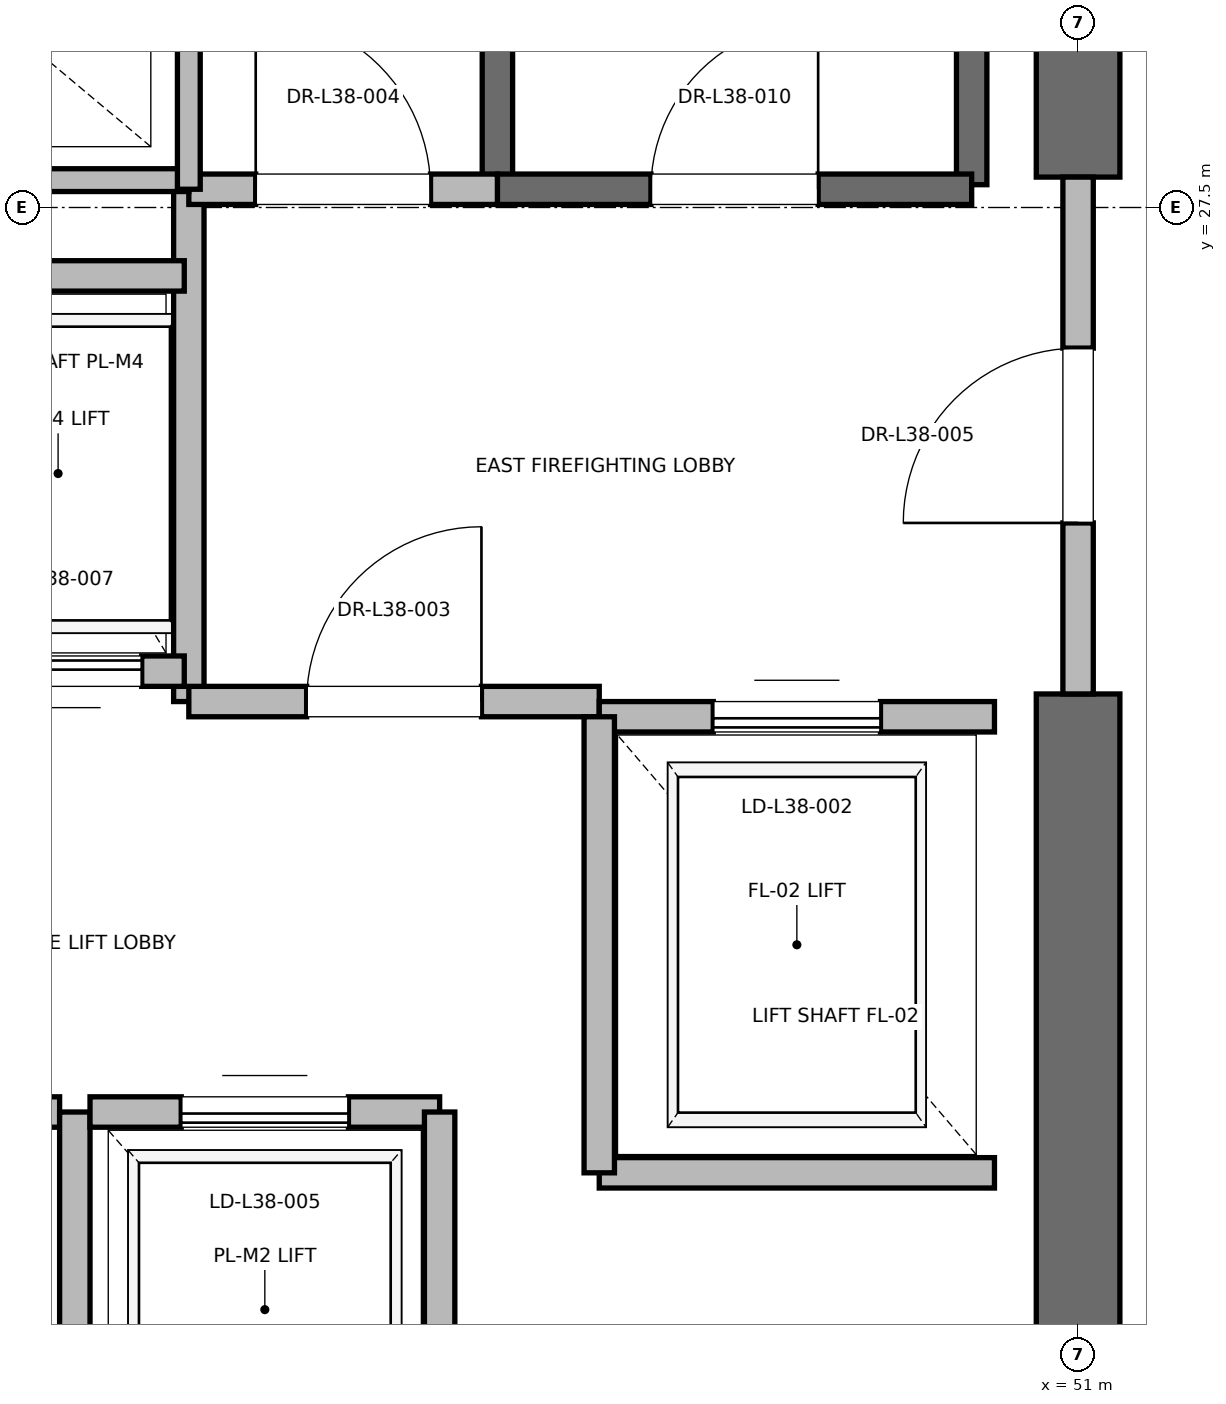
"""IFC4 building model, lengths in metres.
Left out: names, types, materials, properties, quantities, classifications, styles, units other than length and angle.
Written with IfcOpenShell. Run it as: python <this file> out.ifc"""

import sys

from ifc_helpers import new_model, si_unit, direction, frame, frame_2d, origin, place, context, subcontext, project, spatial, rectangle, extrude, element, fill, save


model = new_model("IFC4")
c1 = context("Model", 3, precision=1e-05, world=origin(), true_north=direction((0.0, 1.0)))
c2 = subcontext(c1, "Body", "Model", "MODEL_VIEW")
j1 = project(units=[si_unit("LENGTHUNIT", "METRE"), si_unit("PLANEANGLEUNIT", "RADIAN")], contexts=[c1])
p1 = place(None, origin())
s1 = spatial("IfcSite", under=j1, at=p1, CompositionType="ELEMENT")
p2 = place(p1, origin())
s2 = spatial("IfcBuilding", under=s1, at=p2, CompositionType="ELEMENT")
p3 = place(p2, frame((0.0, 0.0, 164.4)))
s3 = spatial("IfcBuildingStorey", under=s2, at=p3, CompositionType="ELEMENT", Elevation=164.4)
p4 = place(p3, frame((51.0, 18.5, 0.0), z_axis=(0.0, 0.0, 1.0), x_axis=(0.0, 1.0, 0.0)))
e1 = element("IfcWall", 1, at=p4, inside=s3, PredefinedType="SHEAR", context=c2, shape_type="SweptSolid", body=[
    extrude(rectangle(XDim=5.8, YDim=0.55, at=frame_2d((2.9, 0.0))), origin(), (0.0, 0.0, 1.0), 3.775),
])
p5 = place(p3, frame((51.0, 27.7, 0.0), z_axis=(0.0, 0.0, 1.0), x_axis=(0.0, 1.0, 0.0)))
e2 = element("IfcWall", 2, at=p5, inside=s3, PredefinedType="SHEAR", context=c2, shape_type="SweptSolid", body=[
    extrude(rectangle(XDim=8.8, YDim=0.55, at=frame_2d((4.4, 0.0))), origin(), (0.0, 0.0, 1.0), 3.775),
])
p6 = place(p3, frame((50.3, 27.65, 0.0), z_axis=(0.0, 0.0, 1.0), x_axis=(0.0, 1.0, 0.0)))
e3 = element("IfcWall", 3, at=p6, inside=s3, PredefinedType="SOLIDWALL", context=c2, shape_type="SweptSolid", body=[
    extrude(rectangle(XDim=8.15, YDim=0.2, at=frame_2d((4.075, 0.0))), origin(), (0.0, 0.0, 1.0), 3.775),
])
p7 = place(p3, frame((47.18, 27.62, 0.0), z_axis=(0.0, 0.0, 1.0), x_axis=(0.0, 1.0, 0.0)))
e4 = element("IfcWall", 4, at=p7, inside=s3, PredefinedType="SOLIDWALL", context=c2, shape_type="SweptSolid", body=[
    extrude(rectangle(XDim=8.18, YDim=0.2, at=frame_2d((4.09, 0.0))), origin(), (0.0, 0.0, 1.0), 3.775),
])
p8 = place(p3, frame((47.18, 27.62, 0.0), z_axis=(0.0, 0.0, 1.0), x_axis=(1.0, 0.0, 0.0)))
e5 = element("IfcWall", 5, at=p8, inside=s3, PredefinedType="SOLIDWALL", context=c2, shape_type="SweptSolid", body=[
    extrude(rectangle(XDim=3.12, YDim=0.2, at=frame_2d((1.56, 0.0))), origin(), (0.0, 0.0, 1.0), 3.775),
])
p9 = place(p8, frame((1.01, 0.0, 0.0)))
e6 = element("IfcOpeningElement", 6, at=p9, cuts=e5, PredefinedType="OPENING", context=c2, shape_type="SweptSolid", body=[
    extrude(rectangle(XDim=1.1, YDim=2.15, at=frame_2d((0.55, 1.075))), frame((0.0, 0.1, 0.0), z_axis=(0.0, -1.0, 0.0), x_axis=(1.0, 0.0, 0.0)), (0.0, 0.0, 1.0), 0.2),
])
p10 = place(p3, frame((45.15, 24.25, 0.0), z_axis=(0.0, 0.0, 1.0), x_axis=(0.0, 1.0, 0.0)))
e7 = element("IfcWall", 7, at=p10, inside=s3, PredefinedType="PARTITIONING", context=c2, shape_type="SweptSolid", body=[
    extrude(rectangle(XDim=3.37, YDim=0.2, at=frame_2d((1.685, 0.0))), origin(), (0.0, 0.0, 1.0), 3.775),
])
p11 = place(p3, frame((45.15, 24.25, 0.0), z_axis=(0.0, 0.0, 1.0), x_axis=(1.0, 0.0, 0.0)))
e8 = element("IfcWall", 8, at=p11, inside=s3, PredefinedType="PARTITIONING", context=c2, shape_type="SweptSolid", body=[
    extrude(rectangle(XDim=2.7, YDim=0.2, at=frame_2d((1.35, 0.0))), origin(), (0.0, 0.0, 1.0), 3.775),
])
p12 = place(p11, frame((0.775, 0.0, 0.0)))
e9 = element("IfcOpeningElement", 9, at=p12, cuts=e8, PredefinedType="OPENING", context=c2, shape_type="SweptSolid", body=[
    extrude(rectangle(XDim=1.15, YDim=2.2, at=frame_2d((0.575, 1.1))), frame((0.0, 0.1, 0.0), z_axis=(0.0, -1.0, 0.0), x_axis=(1.0, 0.0, 0.0)), (0.0, 0.0, 1.0), 0.2),
])
p13 = place(p3, frame((45.15, 27.62, 0.0), z_axis=(0.0, 0.0, 1.0), x_axis=(1.0, 0.0, 0.0)))
e10 = element("IfcWall", 10, at=p13, inside=s3, PredefinedType="PARTITIONING", context=c2, shape_type="SweptSolid", body=[
    extrude(rectangle(XDim=2.03, YDim=0.2, at=frame_2d((1.015, 0.0))), origin(), (0.0, 0.0, 1.0), 3.775),
])
p14 = place(p13, frame((0.44, 0.0, 0.0)))
e11 = element("IfcOpeningElement", 11, at=p14, cuts=e10, PredefinedType="OPENING", context=c2, shape_type="SweptSolid", body=[
    extrude(rectangle(XDim=1.15, YDim=2.2, at=frame_2d((0.575, 1.1))), frame((0.0, 0.1, 0.0), z_axis=(0.0, -1.0, 0.0), x_axis=(1.0, 0.0, 0.0)), (0.0, 0.0, 1.0), 0.2),
])
p15 = place(p3, frame((51.0, 24.3, 0.0), z_axis=(0.0, 0.0, 1.0), x_axis=(0.0, 1.0, 0.0)))
e12 = element("IfcWall", 12, at=p15, inside=s3, PredefinedType="PARTITIONING", context=c2, shape_type="SweptSolid", body=[
    extrude(rectangle(XDim=3.4, YDim=0.2, at=frame_2d((1.7, 0.0))), origin(), (0.0, 0.0, 1.0), 2.755),
])
p16 = place(p15, frame((1.125, 0.0, 0.0)))
e13 = element("IfcOpeningElement", 13, at=p16, cuts=e12, PredefinedType="OPENING", context=c2, shape_type="SweptSolid", body=[
    extrude(rectangle(XDim=1.15, YDim=2.2, at=frame_2d((0.575, 1.1))), frame((0.0, 0.1, 0.0), z_axis=(0.0, -1.0, 0.0), x_axis=(1.0, 0.0, 0.0)), (0.0, 0.0, 1.0), 0.2),
])
p17 = place(p3, frame((47.85, 21.15, 0.0), z_axis=(0.0, 0.0, 1.0), x_axis=(1.0, 0.0, 0.0)))
e14 = element("IfcWall", 14, at=p17, inside=s3, PredefinedType="SOLIDWALL", context=c2, shape_type="SweptSolid", body=[
    extrude(rectangle(XDim=2.6, YDim=0.2, at=frame_2d((1.3, 0.0))), origin(), (0.0, 0.0, 1.0), 3.775),
])
p18 = place(p3, frame((50.45, 24.15, 0.0), z_axis=(0.0, 0.0, 1.0), x_axis=(-1.0, 0.0, 0.0)))
e15 = element("IfcWall", 15, at=p18, inside=s3, PredefinedType="SOLIDWALL", context=c2, shape_type="SweptSolid", body=[
    extrude(rectangle(XDim=2.6, YDim=0.2, at=frame_2d((1.3, 0.0))), origin(), (0.0, 0.0, 1.0), 2.755),
])
p19 = place(p18, frame((0.75, 0.0, 0.0)))
e16 = element("IfcOpeningElement", 16, at=p19, cuts=e15, PredefinedType="OPENING", context=c2, shape_type="SweptSolid", body=[
    extrude(rectangle(XDim=1.1, YDim=2.2, at=frame_2d((0.55, 1.1))), frame((0.0, 0.1, 0.0), z_axis=(0.0, -1.0, 0.0), x_axis=(1.0, 0.0, 0.0)), (0.0, 0.0, 1.0), 0.2),
])
p20 = place(p3, frame((47.85, 24.15, 0.0), z_axis=(0.0, 0.0, 1.0), x_axis=(0.0, -1.0, 0.0)))
e17 = element("IfcWall", 17, at=p20, inside=s3, PredefinedType="SOLIDWALL", context=c2, shape_type="SweptSolid", body=[
    extrude(rectangle(XDim=3.0, YDim=0.2, at=frame_2d((1.5, 0.0))), origin(), (0.0, 0.0, 1.0), 3.775),
])
p21 = place(p3, frame((44.3, 21.55, 0.0), z_axis=(0.0, 0.0, 1.0), x_axis=(-1.0, 0.0, 0.0)))
e18 = element("IfcWall", 18, at=p21, inside=s3, PredefinedType="SOLIDWALL", context=c2, shape_type="SweptSolid", body=[
    extrude(rectangle(XDim=2.3, YDim=0.2, at=frame_2d((1.15, 0.0))), origin(), (0.0, 0.0, 1.0), 3.775),
])
p22 = place(p21, frame((0.6, 0.0, 0.0)))
e19 = element("IfcOpeningElement", 19, at=p22, cuts=e18, PredefinedType="OPENING", context=c2, shape_type="SweptSolid", body=[
    extrude(rectangle(XDim=1.1, YDim=2.2, at=frame_2d((0.55, 1.1))), frame((0.0, 0.1, 0.0), z_axis=(0.0, -1.0, 0.0), x_axis=(1.0, 0.0, 0.0)), (0.0, 0.0, 1.0), 0.2),
])
p23 = place(p3, frame((44.4, 18.95, 0.0), z_axis=(0.0, 0.0, 1.0), x_axis=(0.0, 1.0, 0.0)))
e20 = element("IfcWall", 20, at=p23, inside=s3, PredefinedType="SOLIDWALL", context=c2, shape_type="SweptSolid", body=[
    extrude(rectangle(XDim=2.6, YDim=0.2, at=frame_2d((1.3, 0.0))), origin(), (0.0, 0.0, 1.0), 3.775),
])
p24 = place(p3, frame((46.8, 21.55, 0.0), z_axis=(0.0, 0.0, 1.0), x_axis=(-1.0, 0.0, 0.0)))
e21 = element("IfcWall", 21, at=p24, inside=s3, PredefinedType="SOLIDWALL", context=c2, shape_type="SweptSolid", body=[
    extrude(rectangle(XDim=2.3, YDim=0.2, at=frame_2d((1.15, 0.0))), origin(), (0.0, 0.0, 1.0), 3.775),
])
p25 = place(p24, frame((0.6, 0.0, 0.0)))
e22 = element("IfcOpeningElement", 22, at=p25, cuts=e21, PredefinedType="OPENING", context=c2, shape_type="SweptSolid", body=[
    extrude(rectangle(XDim=1.1, YDim=2.2, at=frame_2d((0.55, 1.1))), frame((0.0, 0.1, 0.0), z_axis=(0.0, -1.0, 0.0), x_axis=(1.0, 0.0, 0.0)), (0.0, 0.0, 1.0), 0.2),
])
p26 = place(p3, frame((46.8, 18.95, 0.0), z_axis=(0.0, 0.0, 1.0), x_axis=(0.0, 1.0, 0.0)))
e23 = element("IfcWall", 23, at=p26, inside=s3, PredefinedType="SOLIDWALL", context=c2, shape_type="SweptSolid", body=[
    extrude(rectangle(XDim=2.6, YDim=0.2, at=frame_2d((1.3, 0.0))), origin(), (0.0, 0.0, 1.0), 3.775),
])
p27 = place(p3, frame((43.46, 24.45, 0.0), z_axis=(0.0, 0.0, 1.0), x_axis=(1.0, 0.0, 0.0)))
e24 = element("IfcWall", 24, at=p27, inside=s3, PredefinedType="SOLIDWALL", context=c2, shape_type="SweptSolid", body=[
    extrude(rectangle(XDim=1.66, YDim=0.2, at=frame_2d((0.83, 0.0))), origin(), (0.0, 0.0, 1.0), 3.775),
])
p28 = place(p27, frame((0.28, 0.0, 0.0)))
e25 = element("IfcOpeningElement", 25, at=p28, cuts=e24, PredefinedType="OPENING", context=c2, shape_type="SweptSolid", body=[
    extrude(rectangle(XDim=1.1, YDim=2.2, at=frame_2d((0.55, 1.1))), frame((0.0, 0.1, 0.0), z_axis=(0.0, -1.0, 0.0), x_axis=(1.0, 0.0, 0.0)), (0.0, 0.0, 1.0), 0.2),
])
p29 = place(p3, frame((45.12, 27.05, 0.0), z_axis=(0.0, 0.0, 1.0), x_axis=(-1.0, 0.0, 0.0)))
e26 = element("IfcWall", 26, at=p29, inside=s3, PredefinedType="SOLIDWALL", context=c2, shape_type="SweptSolid", body=[
    extrude(rectangle(XDim=1.66, YDim=0.2, at=frame_2d((0.83, 0.0))), origin(), (0.0, 0.0, 1.0), 3.775),
])
p30 = place(p3, frame((41.56, 27.68, 0.0), z_axis=(0.0, 0.0, 1.0), x_axis=(1.0, 0.0, 0.0)))
e27 = element("IfcWall", 27, at=p30, inside=s3, PredefinedType="PARTITIONING", context=c2, shape_type="SweptSolid", body=[
    extrude(rectangle(XDim=3.59, YDim=0.15, at=frame_2d((1.795, 0.0))), origin(), (0.0, 0.0, 1.0), 2.85),
])
p31 = place(p3, frame((45.15, 27.62, 0.0), z_axis=(0.0, 0.0, 1.0), x_axis=(0.0, 1.0, 0.0)))
e28 = element("IfcWall", 28, at=p31, inside=s3, PredefinedType="PARTITIONING", context=c2, shape_type="SweptSolid", body=[
    extrude(rectangle(XDim=3.1, YDim=0.15, at=frame_2d((1.55, 0.0))), origin(), (0.0, 0.0, 1.0), 2.85),
])
p32 = place(p9, origin())
e29 = element("IfcDoor", 29, at=p32, inside=s3, OperationType="SINGLE_SWING_RIGHT", PredefinedType="DOOR", context=c2, shape_type="SweptSolid", body=[
    extrude(rectangle(XDim=1.1, YDim=2.15, at=frame_2d((0.55, 1.075))), frame((0.0, 0.025, 0.0), z_axis=(0.0, -1.0, 0.0), x_axis=(1.0, 0.0, 0.0)), (0.0, 0.0, 1.0), 0.05),
])
fill(e6, e29)
p33 = place(p12, origin())
e30 = element("IfcDoor", 30, at=p33, inside=s3, OperationType="SINGLE_SWING_RIGHT", PredefinedType="DOOR", context=c2, shape_type="SweptSolid", body=[
    extrude(rectangle(XDim=1.15, YDim=2.2, at=frame_2d((0.575, 1.1))), frame((0.0, 0.025, 0.0), z_axis=(0.0, -1.0, 0.0), x_axis=(1.0, 0.0, 0.0)), (0.0, 0.0, 1.0), 0.05),
])
fill(e9, e30)
p34 = place(p14, origin())
e31 = element("IfcDoor", 31, at=p34, inside=s3, OperationType="SINGLE_SWING_LEFT", PredefinedType="DOOR", context=c2, shape_type="SweptSolid", body=[
    extrude(rectangle(XDim=1.15, YDim=2.2, at=frame_2d((0.575, 1.1))), frame((0.0, 0.025, 0.0), z_axis=(0.0, -1.0, 0.0), x_axis=(1.0, 0.0, 0.0)), (0.0, 0.0, 1.0), 0.05),
])
fill(e11, e31)
p35 = place(p16, origin())
e32 = element("IfcDoor", 32, at=p35, inside=s3, OperationType="SINGLE_SWING_LEFT", PredefinedType="DOOR", context=c2, shape_type="SweptSolid", body=[
    extrude(rectangle(XDim=1.15, YDim=2.2, at=frame_2d((0.575, 1.1))), frame((0.0, 0.025, 0.0), z_axis=(0.0, -1.0, 0.0), x_axis=(1.0, 0.0, 0.0)), (0.0, 0.0, 1.0), 0.05),
])
fill(e13, e32)
p36 = place(p19, origin())
e33 = element("IfcDoor", 33, at=p36, inside=s3, OperationType="SLIDING_TO_RIGHT", PredefinedType="DOOR", context=c2, shape_type="SweptSolid", body=[
    extrude(rectangle(XDim=1.1, YDim=2.2, at=frame_2d((0.55, 1.1))), frame((0.0, 0.025, 0.0), z_axis=(0.0, -1.0, 0.0), x_axis=(1.0, 0.0, 0.0)), (0.0, 0.0, 1.0), 0.05),
])
fill(e16, e33)
p37 = place(p25, origin())
e34 = element("IfcDoor", 34, at=p37, inside=s3, OperationType="SLIDING_TO_RIGHT", PredefinedType="DOOR", context=c2, shape_type="SweptSolid", body=[
    extrude(rectangle(XDim=1.1, YDim=2.2, at=frame_2d((0.55, 1.1))), frame((0.0, 0.025, 0.0), z_axis=(0.0, -1.0, 0.0), x_axis=(1.0, 0.0, 0.0)), (0.0, 0.0, 1.0), 0.05),
])
fill(e22, e34)
p38 = place(p28, origin())
e35 = element("IfcDoor", 35, at=p38, inside=s3, OperationType="SLIDING_TO_RIGHT", PredefinedType="DOOR", context=c2, shape_type="SweptSolid", body=[
    extrude(rectangle(XDim=1.1, YDim=2.2, at=frame_2d((0.55, 1.1))), frame((0.0, 0.025, 0.0), z_axis=(0.0, -1.0, 0.0), x_axis=(1.0, 0.0, 0.0)), (0.0, 0.0, 1.0), 0.05),
])
fill(e25, e35)
save(model, sys.argv[1])
